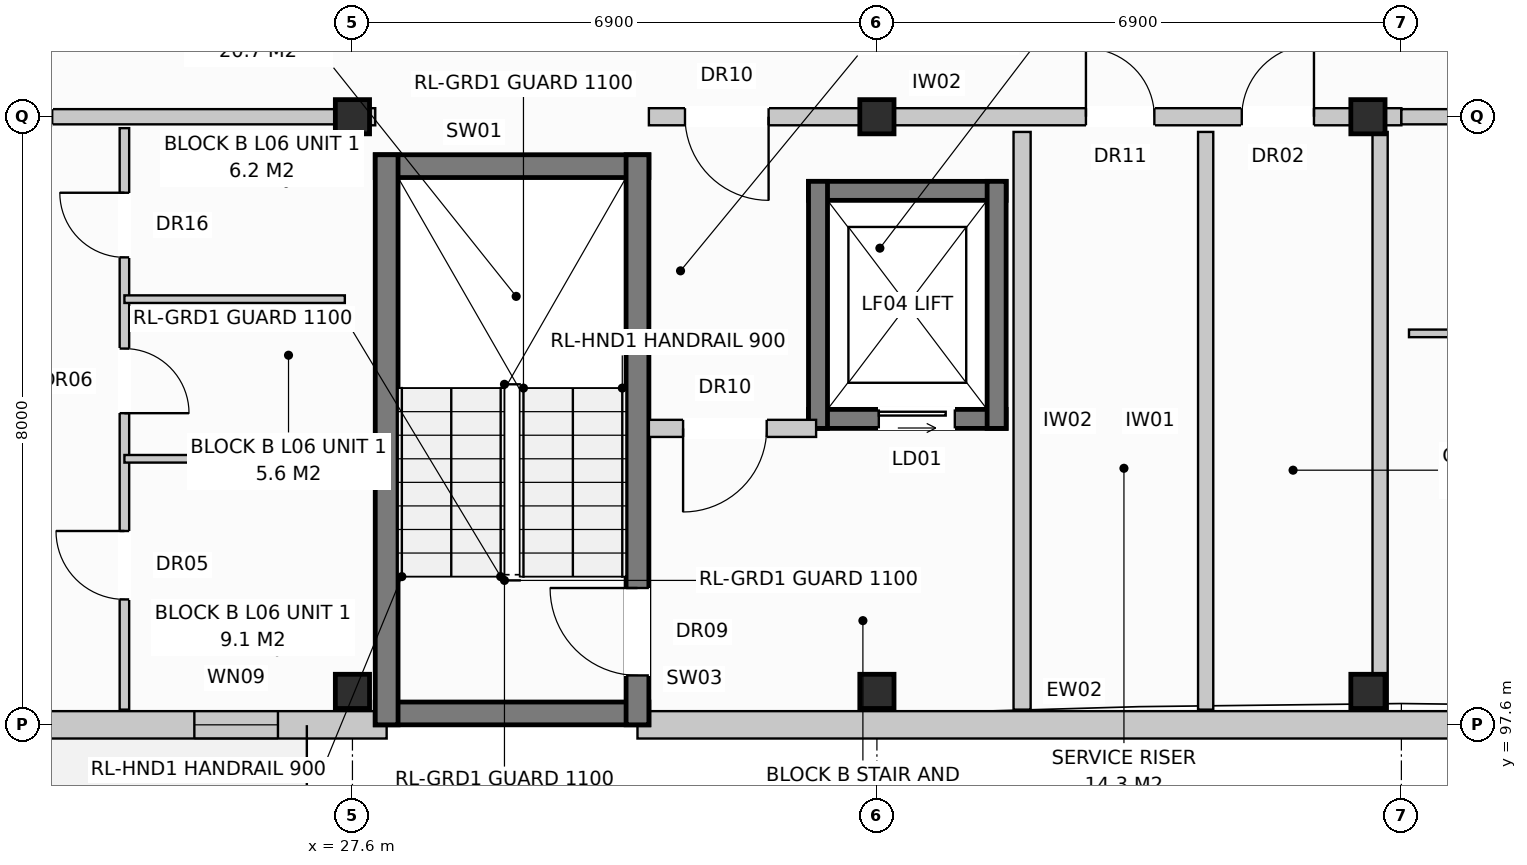
"""IFC4 building model, lengths in metres.
Left out: names, types, materials, properties, quantities, classifications, styles, units other than length and angle.
Written with IfcOpenShell. Run it as: python <this file> out.ifc"""

import sys

from ifc_helpers import new_model, si_unit, direction, frame, frame_2d, origin, origin_with_axes, origin_2d, place, context, subcontext, project, spatial, rectangle, extrude, element, fill, save


model = new_model("IFC4")
c1 = context("Model", 3, precision=1e-05, world=origin(), true_north=direction((0.0, 1.0)))
c2 = subcontext(c1, "Body", "Model", "MODEL_VIEW")
j1 = project(units=[si_unit("LENGTHUNIT", "METRE"), si_unit("PLANEANGLEUNIT", "RADIAN")], contexts=[c1])
p1 = place(None, origin())
s1 = spatial("IfcSite", under=j1, at=p1, CompositionType="ELEMENT")
p2 = place(p1, origin())
s2 = spatial("IfcBuilding", under=s1, at=p2, CompositionType="ELEMENT")
p3 = place(p2, frame((0.0, 0.0, 20.8)))
s3 = spatial("IfcBuildingStorey", under=s2, at=p3, CompositionType="ELEMENT", Elevation=20.8)
for number, where, z_axis, x_axis in (
    (1, (27.6, 98.04, 0.0), (0.0, 0.0, 1.0), (1.0, 0.0, 0.0)),
    (2, (27.6, 105.6, 0.0), (0.0, 0.0, 1.0), (1.0, 0.0, 0.0)),
    (3, (34.5, 98.04, 0.0), (0.0, 0.0, 1.0), (1.0, 0.0, 0.0)),
    (4, (34.5, 105.6, 0.0), (0.0, 0.0, 1.0), (1.0, 0.0, 0.0)),
    (5, (40.96, 98.04, 0.0), (0.0, 0.0, 1.0), (1.0, 0.0, 0.0)),
    (6, (40.96, 105.6, 0.0), (0.0, 0.0, 1.0), (1.0, 0.0, 0.0)),
):
    element("IfcColumn", number, at=place(p3, frame(where, z_axis=z_axis, x_axis=x_axis)), inside=s3, PredefinedType="COLUMN", context=c2, shape_type="SweptSolid", body=[
        extrude(rectangle(XDim=0.45, YDim=0.45, at=origin_2d()), origin(), (0.0, 0.0, 1.0), 3.2),
    ])
p4 = place(p3, frame((10.65, 97.6, 0.0), z_axis=(0.0, 0.0, 1.0), x_axis=(1.0, 0.0, 0.0)))
e7 = element("IfcWall", 7, at=p4, inside=s3, PredefinedType="STANDARD", context=c2, shape_type="SweptSolid", body=[
    extrude(rectangle(XDim=17.4, YDim=0.36, at=frame_2d((8.7, 0.0))), origin(), (0.0, 0.0, 1.0), 2.95),
])
p5 = place(p4, frame((11.87, 0.0, 0.0)))
e8 = element("IfcOpeningElement", 8, at=p5, cuts=e7, PredefinedType="OPENING", context=c2, shape_type="SweptSolid", body=[
    extrude(rectangle(XDim=0.95, YDim=2.1, at=frame_2d((0.475, 1.05))), frame((0.0, 0.192, 0.0), z_axis=(0.0, -1.0, 0.0), x_axis=(1.0, 0.0, 0.0)), (0.0, 0.0, 1.0), 0.384),
])
p6 = place(p4, frame((14.87, 0.0, 0.72)))
e9 = element("IfcOpeningElement", 9, at=p6, cuts=e7, PredefinedType="OPENING", context=c2, shape_type="SweptSolid", body=[
    extrude(rectangle(XDim=1.1, YDim=1.5, at=frame_2d((0.55, 0.75))), frame((0.0, 0.192, 0.0), z_axis=(0.0, -1.0, 0.0), x_axis=(1.0, 0.0, 0.0)), (0.0, 0.0, 1.0), 0.384),
])
p7 = place(p3, frame((31.35, 97.6, 0.0), z_axis=(0.0, 0.0, 1.0), x_axis=(1.0, 0.0, 0.0)))
e10 = element("IfcWall", 10, at=p7, inside=s3, PredefinedType="STANDARD", context=c2, shape_type="SweptSolid", body=[
    extrude(rectangle(XDim=23.68, YDim=0.36, at=frame_2d((11.84, 0.0))), origin(), (0.0, 0.0, 1.0), 2.95),
])
p8 = place(p7, frame((15.304, 0.0, 0.0)))
e11 = element("IfcOpeningElement", 11, at=p8, cuts=e10, PredefinedType="OPENING", context=c2, shape_type="SweptSolid", body=[
    extrude(rectangle(XDim=0.95, YDim=2.1, at=frame_2d((0.475, 1.05))), frame((0.0, 0.192, 0.0), z_axis=(0.0, -1.0, 0.0), x_axis=(1.0, 0.0, 0.0)), (0.0, 0.0, 1.0), 0.384),
])
p9 = place(p7, frame((11.245, 0.0, 0.8)))
e12 = element("IfcOpeningElement", 12, at=p9, cuts=e10, PredefinedType="OPENING", context=c2, shape_type="SweptSolid", body=[
    extrude(rectangle(XDim=1.95, YDim=1.65, at=frame_2d((0.975, 0.825))), frame((0.0, 0.192, 0.0), z_axis=(0.0, -1.0, 0.0), x_axis=(1.0, 0.0, 0.0)), (0.0, 0.0, 1.0), 0.384),
])
p10 = place(p7, frame((20.27, 0.0, 0.8)))
e13 = element("IfcOpeningElement", 13, at=p10, cuts=e10, PredefinedType="OPENING", context=c2, shape_type="SweptSolid", body=[
    extrude(rectangle(XDim=1.9, YDim=1.85, at=frame_2d((0.95, 0.925))), frame((0.0, 0.192, 0.0), z_axis=(0.0, -1.0, 0.0), x_axis=(1.0, 0.0, 0.0)), (0.0, 0.0, 1.0), 0.384),
])
for number, where, z_axis, x_axis in (
    (14, (27.9, 97.75, 0.0), (0.0, 0.0, 1.0), (1.0, 0.0, 0.0)),
    (15, (27.9, 104.95, 0.0), (0.0, 0.0, 1.0), (1.0, 0.0, 0.0)),
):
    element("IfcWall", number, at=place(p3, frame(where, z_axis=z_axis, x_axis=x_axis)), inside=s3, PredefinedType="SHEAR", context=c2, shape_type="SweptSolid", body=[
        extrude(rectangle(XDim=3.6, YDim=0.3, at=frame_2d((1.8, 0.0))), origin(), (0.0, 0.0, 1.0), 2.95),
    ])
p11 = place(p3, frame((28.05, 97.6, 0.0), z_axis=(0.0, 0.0, 1.0), x_axis=(0.0, 1.0, 0.0)))
e16 = element("IfcWall", 16, at=p11, inside=s3, PredefinedType="SHEAR", context=c2, shape_type="SweptSolid", body=[
    extrude(rectangle(XDim=7.5, YDim=0.3, at=frame_2d((3.75, 0.0))), origin(), (0.0, 0.0, 1.0), 2.95),
])
p12 = place(p3, frame((31.35, 97.6, 0.0), z_axis=(0.0, 0.0, 1.0), x_axis=(0.0, 1.0, 0.0)))
e17 = element("IfcWall", 17, at=p12, inside=s3, PredefinedType="SHEAR", context=c2, shape_type="SweptSolid", body=[
    extrude(rectangle(XDim=7.5, YDim=0.3, at=frame_2d((3.75, 0.0))), origin(), (0.0, 0.0, 1.0), 2.95),
])
p13 = place(p12, frame((0.65, 0.0, 0.0)))
e18 = element("IfcOpeningElement", 18, at=p13, cuts=e17, PredefinedType="OPENING", context=c2, shape_type="SweptSolid", body=[
    extrude(rectangle(XDim=1.15, YDim=2.15, at=frame_2d((0.575, 1.075))), frame((0.0, 0.162, 0.0), z_axis=(0.0, -1.0, 0.0), x_axis=(1.0, 0.0, 0.0)), (0.0, 0.0, 1.0), 0.324),
])
p14 = place(p3, frame((33.6, 101.625, 0.0), z_axis=(0.0, 0.0, 1.0), x_axis=(1.0, 0.0, 0.0)))
e19 = element("IfcWall", 19, at=p14, inside=s3, PredefinedType="SHEAR", context=c2, shape_type="SweptSolid", body=[
    extrude(rectangle(XDim=2.6, YDim=0.25, at=frame_2d((1.3, 0.0))), origin(), (0.0, 0.0, 1.0), 2.95),
])
p15 = place(p14, frame((0.925, 0.0, 0.0)))
e20 = element("IfcOpeningElement", 20, at=p15, cuts=e19, PredefinedType="OPENING", context=c2, shape_type="SweptSolid", body=[
    extrude(rectangle(XDim=1.0, YDim=2.1, at=frame_2d((0.5, 1.05))), frame((0.0, 0.137, 0.0), z_axis=(0.0, -1.0, 0.0), x_axis=(1.0, 0.0, 0.0)), (0.0, 0.0, 1.0), 0.274),
])
p16 = place(p3, frame((33.6, 104.625, 0.0), z_axis=(0.0, 0.0, 1.0), x_axis=(1.0, 0.0, 0.0)))
e21 = element("IfcWall", 21, at=p16, inside=s3, PredefinedType="SHEAR", context=c2, shape_type="SweptSolid", body=[
    extrude(rectangle(XDim=2.6, YDim=0.25, at=frame_2d((1.3, 0.0))), origin(), (0.0, 0.0, 1.0), 2.95),
])
for number, where, z_axis, x_axis in (
    (22, (33.725, 101.5, 0.0), (0.0, 0.0, 1.0), (0.0, 1.0, 0.0)),
    (23, (36.075, 101.5, 0.0), (0.0, 0.0, 1.0), (0.0, 1.0, 0.0)),
):
    element("IfcWall", number, at=place(p3, frame(where, z_axis=z_axis, x_axis=x_axis)), inside=s3, PredefinedType="SHEAR", context=c2, shape_type="SweptSolid", body=[
        extrude(rectangle(XDim=3.25, YDim=0.25, at=frame_2d((1.625, 0.0))), origin(), (0.0, 0.0, 1.0), 2.95),
    ])
p17 = place(p3, frame((36.41, 97.8, 0.0), z_axis=(0.0, 0.0, 1.0), x_axis=(0.0, 1.0, 0.0)))
e24 = element("IfcWall", 24, at=p17, inside=s3, PredefinedType="PARTITIONING", context=c2, shape_type="SweptSolid", body=[
    extrude(rectangle(XDim=7.6, YDim=0.225, at=frame_2d((3.8, 0.0))), origin(), (0.0, 0.0, 1.0), 2.59),
])
p18 = place(p3, frame((31.5, 101.5, 0.0), z_axis=(0.0, 0.0, 1.0), x_axis=(1.0, 0.0, 0.0)))
e25 = element("IfcWall", 25, at=p18, inside=s3, PredefinedType="PARTITIONING", context=c2, shape_type="SweptSolid", body=[
    extrude(rectangle(XDim=2.2, YDim=0.225, at=frame_2d((1.1, 0.0))), origin(), (0.0, 0.0, 1.0), 2.95),
])
p19 = place(p18, frame((0.45, 0.0, 0.0)))
e26 = element("IfcOpeningElement", 26, at=p19, cuts=e25, PredefinedType="OPENING", context=c2, shape_type="SweptSolid", body=[
    extrude(rectangle(XDim=1.1, YDim=2.15, at=frame_2d((0.55, 1.075))), frame((0.0, 0.125, 0.0), z_axis=(0.0, -1.0, 0.0), x_axis=(1.0, 0.0, 0.0)), (0.0, 0.0, 1.0), 0.249),
])
p20 = place(p3, frame((27.6, 105.6, 0.0), z_axis=(0.0, 0.0, 1.0), x_axis=(1.0, 0.0, 0.0)))
e27 = element("IfcWall", 27, at=p20, inside=s3, PredefinedType="PARTITIONING", context=c2, shape_type="SweptSolid", body=[
    extrude(rectangle(XDim=0.3, YDim=0.225, at=frame_2d((0.15, 0.0))), origin(), (0.0, 0.0, 1.0), 2.95),
])
p21 = place(p3, frame((38.825, 97.8, 0.0), z_axis=(0.0, 0.0, 1.0), x_axis=(0.0, 1.0, 0.0)))
e28 = element("IfcWall", 28, at=p21, inside=s3, PredefinedType="PARTITIONING", context=c2, shape_type="SweptSolid", body=[
    extrude(rectangle(XDim=7.6, YDim=0.2, at=frame_2d((3.8, 0.0))), origin(), (0.0, 0.0, 1.0), 2.95),
])
p22 = place(p3, frame((41.12, 97.8, 0.0), z_axis=(0.0, 0.0, 1.0), x_axis=(0.0, 1.0, 0.0)))
e29 = element("IfcWall", 29, at=p22, inside=s3, PredefinedType="PARTITIONING", context=c2, shape_type="SweptSolid", body=[
    extrude(rectangle(XDim=7.6, YDim=0.2, at=frame_2d((3.8, 0.0))), origin(), (0.0, 0.0, 1.0), 2.39),
])
p23 = place(p3, frame((31.5, 105.6, 0.0), z_axis=(0.0, 0.0, 1.0), x_axis=(1.0, 0.0, 0.0)))
e30 = element("IfcWall", 30, at=p23, inside=s3, PredefinedType="PARTITIONING", context=c2, shape_type="SweptSolid", body=[
    extrude(rectangle(XDim=9.9, YDim=0.225, at=frame_2d((4.95, 0.0))), origin(), (0.0, 0.0, 1.0), 2.39),
])
p24 = place(p23, frame((0.475, 0.0, 0.0)))
e31 = element("IfcOpeningElement", 31, at=p24, cuts=e30, PredefinedType="OPENING", context=c2, shape_type="SweptSolid", body=[
    extrude(rectangle(XDim=1.1, YDim=2.15, at=frame_2d((0.55, 1.075))), frame((0.0, 0.125, 0.0), z_axis=(0.0, -1.0, 0.0), x_axis=(1.0, 0.0, 0.0)), (0.0, 0.0, 1.0), 0.249),
])
p25 = place(p23, frame((5.75, 0.0, 0.0)))
e32 = element("IfcOpeningElement", 32, at=p25, cuts=e30, PredefinedType="OPENING", context=c2, shape_type="SweptSolid", body=[
    extrude(rectangle(XDim=0.9, YDim=2.1, at=frame_2d((0.45, 1.05))), frame((0.0, 0.125, 0.0), z_axis=(0.0, -1.0, 0.0), x_axis=(1.0, 0.0, 0.0)), (0.0, 0.0, 1.0), 0.249),
])
p26 = place(p23, frame((7.8, 0.0, 0.0)))
e33 = element("IfcOpeningElement", 33, at=p26, cuts=e30, PredefinedType="OPENING", context=c2, shape_type="SweptSolid", body=[
    extrude(rectangle(XDim=0.95, YDim=2.15, at=frame_2d((0.475, 1.075))), frame((0.0, 0.125, 0.0), z_axis=(0.0, -1.0, 0.0), x_axis=(1.0, 0.0, 0.0)), (0.0, 0.0, 1.0), 0.249),
])
p27 = place(p3, frame((20.7, 105.6, 0.0), z_axis=(0.0, 0.0, 1.0), x_axis=(1.0, 0.0, 0.0)))
e34 = element("IfcWall", 34, at=p27, inside=s3, PredefinedType="PARTITIONING", context=c2, shape_type="SweptSolid", body=[
    extrude(rectangle(XDim=6.9, YDim=0.2, at=frame_2d((3.45, 0.0))), origin(), (0.0, 0.0, 1.0), 2.39),
])
p28 = place(p27, frame((2.0, 0.0, 0.0)))
e35 = element("IfcOpeningElement", 35, at=p28, cuts=e34, PredefinedType="OPENING", context=c2, shape_type="SweptSolid", body=[
    extrude(rectangle(XDim=0.95, YDim=2.15, at=frame_2d((0.475, 1.075))), frame((0.0, 0.112, 0.0), z_axis=(0.0, -1.0, 0.0), x_axis=(1.0, 0.0, 0.0)), (0.0, 0.0, 1.0), 0.224),
])
p29 = place(p3, frame((24.6, 105.45, 0.0), z_axis=(0.0, 0.0, 1.0), x_axis=(0.0, -1.0, 0.0)))
e36 = element("IfcWall", 36, at=p29, inside=s3, PredefinedType="PARTITIONING", context=c2, shape_type="SweptSolid", body=[
    extrude(rectangle(XDim=7.65, YDim=0.125, at=frame_2d((3.825, 0.0))), origin(), (0.0, 0.0, 1.0), 2.95),
])
p30 = place(p29, frame((0.85, 0.0, 0.0)))
e37 = element("IfcOpeningElement", 37, at=p30, cuts=e36, PredefinedType="OPENING", context=c2, shape_type="SweptSolid", body=[
    extrude(rectangle(XDim=0.85, YDim=2.1, at=frame_2d((0.425, 1.05))), frame((0.0, 0.074, 0.0), z_axis=(0.0, -1.0, 0.0), x_axis=(1.0, 0.0, 0.0)), (0.0, 0.0, 1.0), 0.149),
])
p31 = place(p29, frame((2.9, 0.0, 0.0)))
e38 = element("IfcOpeningElement", 38, at=p31, cuts=e36, PredefinedType="OPENING", context=c2, shape_type="SweptSolid", body=[
    extrude(rectangle(XDim=0.85, YDim=2.05, at=frame_2d((0.425, 1.025))), frame((0.0, 0.074, 0.0), z_axis=(0.0, -1.0, 0.0), x_axis=(1.0, 0.0, 0.0)), (0.0, 0.0, 1.0), 0.149),
])
p32 = place(p29, frame((5.3, 0.0, 0.0)))
e39 = element("IfcOpeningElement", 39, at=p32, cuts=e36, PredefinedType="OPENING", context=c2, shape_type="SweptSolid", body=[
    extrude(rectangle(XDim=0.9, YDim=2.1, at=frame_2d((0.45, 1.05))), frame((0.0, 0.074, 0.0), z_axis=(0.0, -1.0, 0.0), x_axis=(1.0, 0.0, 0.0)), (0.0, 0.0, 1.0), 0.149),
])
for number, where, z_axis, x_axis in (
    (40, (24.6, 103.2, 0.0), (0.0, 0.0, 1.0), (1.0, 0.0, 0.0)),
    (41, (24.6, 101.1, 0.0), (0.0, 0.0, 1.0), (1.0, 0.0, 0.0)),
):
    element("IfcWall", number, at=place(p3, frame(where, z_axis=z_axis, x_axis=x_axis)), inside=s3, PredefinedType="PARTITIONING", context=c2, shape_type="SweptSolid", body=[
        extrude(rectangle(XDim=2.9, YDim=0.1, at=frame_2d((1.45, 0.0))), origin(), (0.0, 0.0, 1.0), 2.95),
    ])
p33 = place(p3, frame((41.4, 105.6, 0.0), z_axis=(0.0, 0.0, 1.0), x_axis=(1.0, 0.0, 0.0)))
e42 = element("IfcWall", 42, at=p33, inside=s3, PredefinedType="PARTITIONING", context=c2, shape_type="SweptSolid", body=[
    extrude(rectangle(XDim=13.8, YDim=0.2, at=frame_2d((6.9, 0.0))), origin(), (0.0, 0.0, 1.0), 2.39),
])
p34 = place(p33, frame((9.6, 0.0, 0.0)))
e43 = element("IfcOpeningElement", 43, at=p34, cuts=e42, PredefinedType="OPENING", context=c2, shape_type="SweptSolid", body=[
    extrude(rectangle(XDim=0.95, YDim=2.15, at=frame_2d((0.475, 1.075))), frame((0.0, 0.112, 0.0), z_axis=(0.0, -1.0, 0.0), x_axis=(1.0, 0.0, 0.0)), (0.0, 0.0, 1.0), 0.224),
])
p35 = place(p3, frame((41.5, 102.75, 0.0), z_axis=(0.0, 0.0, 1.0), x_axis=(1.0, 0.0, 0.0)))
e44 = element("IfcWall", 44, at=p35, inside=s3, PredefinedType="PARTITIONING", context=c2, shape_type="SweptSolid", body=[
    extrude(rectangle(XDim=8.6, YDim=0.1, at=frame_2d((4.3, 0.0))), origin(), (0.0, 0.0, 1.0), 2.95),
])
p36 = place(p35, frame((1.4, 0.0, 0.0)))
e45 = element("IfcOpeningElement", 45, at=p36, cuts=e44, PredefinedType="OPENING", context=c2, shape_type="SweptSolid", body=[
    extrude(rectangle(XDim=0.85, YDim=2.05, at=frame_2d((0.425, 1.025))), frame((0.0, 0.062, 0.0), z_axis=(0.0, -1.0, 0.0), x_axis=(1.0, 0.0, 0.0)), (0.0, 0.0, 1.0), 0.124),
])
p37 = place(p35, frame((4.65, 0.0, 0.0)))
e46 = element("IfcOpeningElement", 46, at=p37, cuts=e44, PredefinedType="OPENING", context=c2, shape_type="SweptSolid", body=[
    extrude(rectangle(XDim=0.85, YDim=2.05, at=frame_2d((0.425, 1.025))), frame((0.0, 0.062, 0.0), z_axis=(0.0, -1.0, 0.0), x_axis=(1.0, 0.0, 0.0)), (0.0, 0.0, 1.0), 0.124),
])
p38 = place(p35, frame((6.8, 0.0, 0.0)))
e47 = element("IfcOpeningElement", 47, at=p38, cuts=e44, PredefinedType="OPENING", context=c2, shape_type="SweptSolid", body=[
    extrude(rectangle(XDim=0.85, YDim=2.1, at=frame_2d((0.425, 1.05))), frame((0.0, 0.062, 0.0), z_axis=(0.0, -1.0, 0.0), x_axis=(1.0, 0.0, 0.0)), (0.0, 0.0, 1.0), 0.124),
])
p39 = place(p6, origin_with_axes())
e48 = element("IfcWindow", 48, at=p39, inside=s3, PartitioningType="SINGLE_PANEL", PredefinedType="WINDOW", context=c2, shape_type="SweptSolid", body=[
    extrude(rectangle(XDim=1.1, YDim=1.5, at=frame_2d((0.55, 0.75))), frame((0.0, 0.03, 0.0), z_axis=(0.0, -1.0, 0.0), x_axis=(1.0, 0.0, 0.0)), (0.0, 0.0, 1.0), 0.06),
])
fill(e9, e48)
p40 = place(p13, origin_with_axes())
e49 = element("IfcDoor", 49, at=p40, inside=s3, OperationType="SINGLE_SWING_RIGHT", PredefinedType="DOOR", context=c2, shape_type="SweptSolid", body=[
    extrude(rectangle(XDim=1.15, YDim=2.15, at=frame_2d((0.575, 1.075))), frame((0.0, 0.025, 0.0), z_axis=(0.0, -1.0, 0.0), x_axis=(1.0, 0.0, 0.0)), (0.0, 0.0, 1.0), 0.05),
])
fill(e18, e49)
p41 = place(p15, origin_with_axes())
e50 = element("IfcDoor", 50, at=p41, inside=s3, OperationType="SLIDING_TO_LEFT", PredefinedType="DOOR", context=c2, shape_type="SweptSolid", body=[
    extrude(rectangle(XDim=1.0, YDim=2.1, at=frame_2d((0.5, 1.05))), frame((0.0, 0.025, 0.0), z_axis=(0.0, -1.0, 0.0), x_axis=(1.0, 0.0, 0.0)), (0.0, 0.0, 1.0), 0.05),
])
fill(e20, e50)
p42 = place(p19, frame((1.1, 0.0, 0.0), z_axis=(0.0, 0.0, 1.0), x_axis=(-1.0, 0.0, 0.0)))
e51 = element("IfcDoor", 51, at=p42, inside=s3, OperationType="SINGLE_SWING_LEFT", PredefinedType="DOOR", context=c2, shape_type="SweptSolid", body=[
    extrude(rectangle(XDim=1.1, YDim=2.15, at=frame_2d((0.55, 1.075))), frame((0.0, 0.025, 0.0), z_axis=(0.0, -1.0, 0.0), x_axis=(1.0, 0.0, 0.0)), (0.0, 0.0, 1.0), 0.05),
])
fill(e26, e51)
p43 = place(p24, frame((1.1, 0.0, 0.0), z_axis=(0.0, 0.0, 1.0), x_axis=(-1.0, 0.0, 0.0)))
e52 = element("IfcDoor", 52, at=p43, inside=s3, OperationType="SINGLE_SWING_RIGHT", PredefinedType="DOOR", context=c2, shape_type="SweptSolid", body=[
    extrude(rectangle(XDim=1.1, YDim=2.15, at=frame_2d((0.55, 1.075))), frame((0.0, 0.025, 0.0), z_axis=(0.0, -1.0, 0.0), x_axis=(1.0, 0.0, 0.0)), (0.0, 0.0, 1.0), 0.05),
])
fill(e31, e52)
p44 = place(p25, origin_with_axes())
e53 = element("IfcDoor", 53, at=p44, inside=s3, OperationType="SINGLE_SWING_LEFT", PredefinedType="DOOR", context=c2, shape_type="SweptSolid", body=[
    extrude(rectangle(XDim=0.9, YDim=2.1, at=frame_2d((0.45, 1.05))), frame((0.0, 0.025, 0.0), z_axis=(0.0, -1.0, 0.0), x_axis=(1.0, 0.0, 0.0)), (0.0, 0.0, 1.0), 0.05),
])
fill(e32, e53)
p45 = place(p26, origin_with_axes())
e54 = element("IfcDoor", 54, at=p45, inside=s3, OperationType="SINGLE_SWING_RIGHT", PredefinedType="DOOR", context=c2, shape_type="SweptSolid", body=[
    extrude(rectangle(XDim=0.95, YDim=2.15, at=frame_2d((0.475, 1.075))), frame((0.0, 0.025, 0.0), z_axis=(0.0, -1.0, 0.0), x_axis=(1.0, 0.0, 0.0)), (0.0, 0.0, 1.0), 0.05),
])
fill(e33, e54)
p46 = place(p30, frame((0.85, 0.0, 0.0), z_axis=(0.0, 0.0, 1.0), x_axis=(-1.0, 0.0, 0.0)))
e55 = element("IfcDoor", 55, at=p46, inside=s3, OperationType="SINGLE_SWING_LEFT", PredefinedType="DOOR", context=c2, shape_type="SweptSolid", body=[
    extrude(rectangle(XDim=0.85, YDim=2.1, at=frame_2d((0.425, 1.05))), frame((0.0, 0.025, 0.0), z_axis=(0.0, -1.0, 0.0), x_axis=(1.0, 0.0, 0.0)), (0.0, 0.0, 1.0), 0.05),
])
fill(e37, e55)
p47 = place(p31, origin_with_axes())
e56 = element("IfcDoor", 56, at=p47, inside=s3, OperationType="SINGLE_SWING_RIGHT", PredefinedType="DOOR", context=c2, shape_type="SweptSolid", body=[
    extrude(rectangle(XDim=0.85, YDim=2.05, at=frame_2d((0.425, 1.025))), frame((0.0, 0.025, 0.0), z_axis=(0.0, -1.0, 0.0), x_axis=(1.0, 0.0, 0.0)), (0.0, 0.0, 1.0), 0.05),
])
fill(e38, e56)
p48 = place(p32, frame((0.9, 0.0, 0.0), z_axis=(0.0, 0.0, 1.0), x_axis=(-1.0, 0.0, 0.0)))
e57 = element("IfcDoor", 57, at=p48, inside=s3, OperationType="SINGLE_SWING_LEFT", PredefinedType="DOOR", context=c2, shape_type="SweptSolid", body=[
    extrude(rectangle(XDim=0.9, YDim=2.1, at=frame_2d((0.45, 1.05))), frame((0.0, 0.025, 0.0), z_axis=(0.0, -1.0, 0.0), x_axis=(1.0, 0.0, 0.0)), (0.0, 0.0, 1.0), 0.05),
])
fill(e39, e57)
save(model, sys.argv[1])
